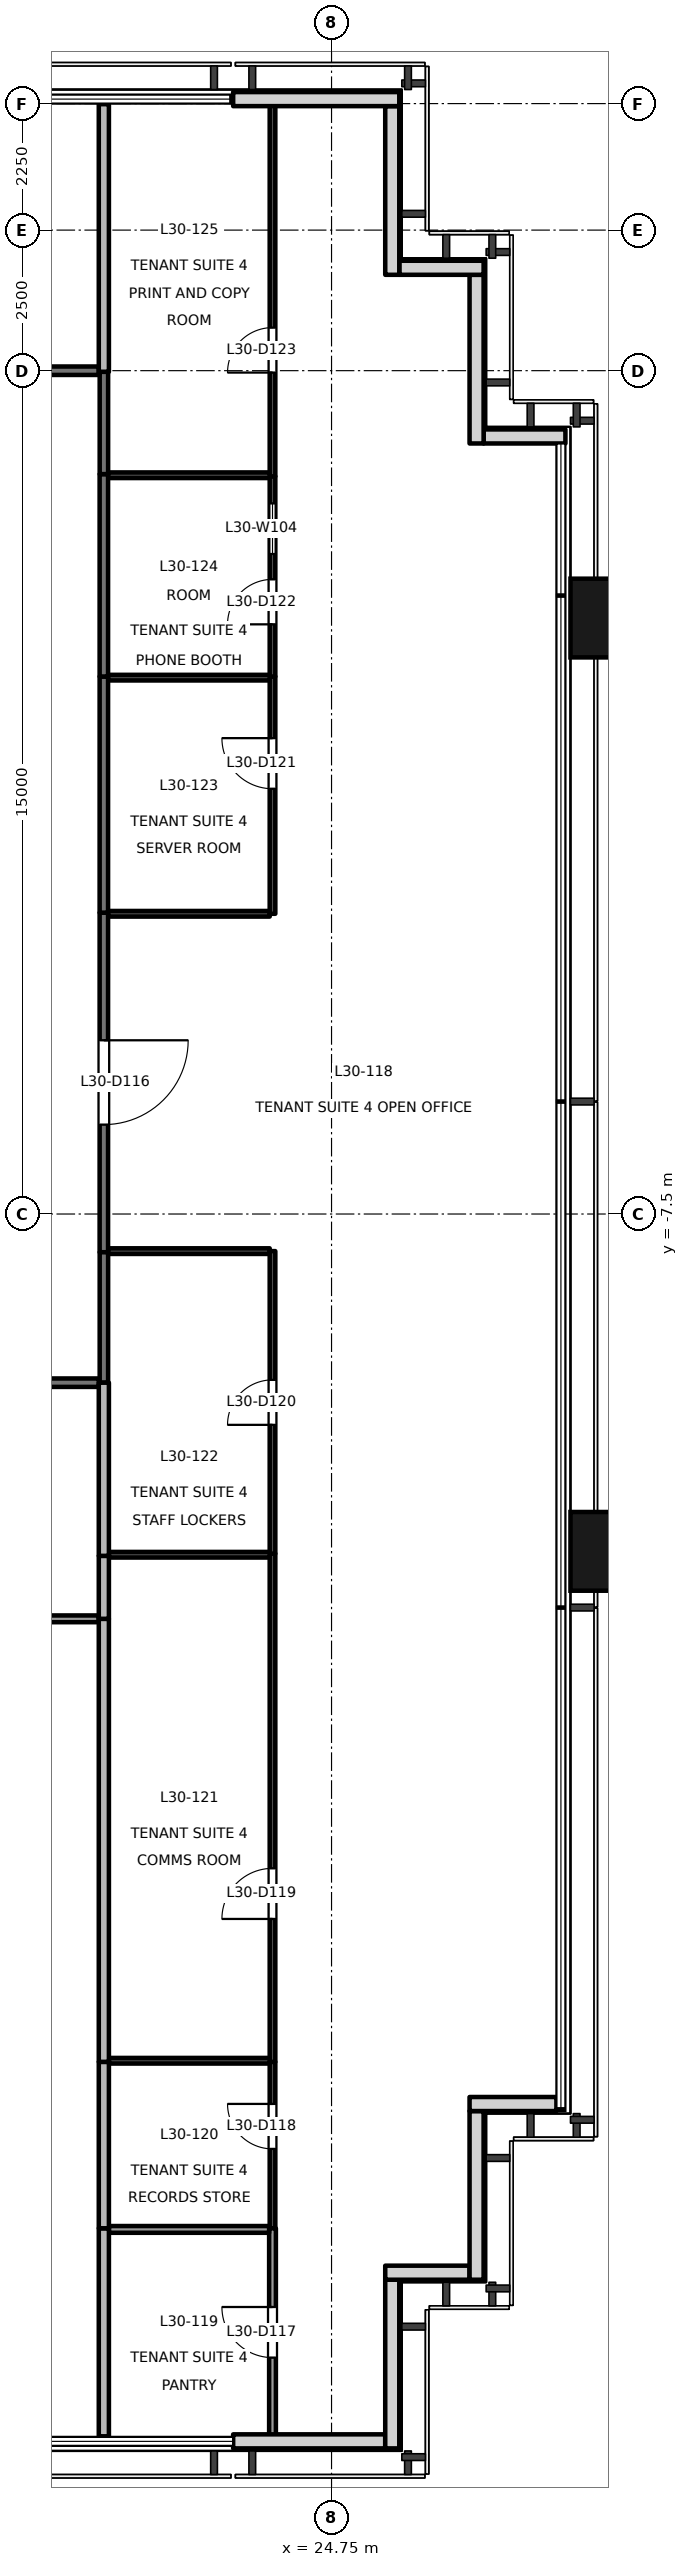
"""IFC4 building model, lengths in metres.
Left out: names, types, materials, properties, quantities, classifications, styles, units other than length and angle.
Written with IfcOpenShell. Run it as: python <this file> out.ifc"""

import sys

from ifc_helpers import new_model, si_unit, direction, frame, frame_2d, origin, origin_2d, place, context, subcontext, project, spatial, rectangle, extrude, element, fill, save


model = new_model("IFC4")
c1 = context("Model", 3, precision=1e-05, world=origin(), true_north=direction((0.0, 1.0)))
c2 = subcontext(c1, "Body", "Model", "MODEL_VIEW")
j1 = project(units=[si_unit("LENGTHUNIT", "METRE"), si_unit("PLANEANGLEUNIT", "RADIAN")], contexts=[c1])
p1 = place(None, origin())
s1 = spatial("IfcSite", under=j1, at=p1, CompositionType="ELEMENT")
p2 = place(p1, origin())
s2 = spatial("IfcBuilding", under=s1, at=p2, CompositionType="ELEMENT")
p3 = place(p2, frame((0.0, 0.0, 134.1)))
s3 = spatial("IfcBuildingStorey", under=s2, at=p3, CompositionType="ELEMENT", Elevation=134.1)
for number, where, z_axis, x_axis in (
    (1, (29.9, -13.5, -0.2), (0.0, 0.0, 1.0), (0.0, 1.0, 0.0)),
    (2, (29.9, 3.1, -0.2), (0.0, 0.0, 1.0), (0.0, 1.0, 0.0)),
):
    element("IfcColumn", number, at=place(p3, frame(where, z_axis=z_axis, x_axis=x_axis)), inside=s3, PredefinedType="COLUMN", context=c2, shape_type="SweptSolid", body=[
        extrude(rectangle(XDim=1.4, YDim=1.8, at=origin_2d()), origin(), (0.0, 0.0, 1.0), 4.0),
    ])
p4 = place(p3, frame((23.0, -29.33, 0.0), z_axis=(0.0, 0.0, 1.0), x_axis=(1.0, 0.0, 0.0)))
e3 = element("IfcWall", 3, at=p4, inside=s3, PredefinedType="SOLIDWALL", context=c2, shape_type="SweptSolid", body=[
    extrude(rectangle(XDim=2.705, YDim=0.25, at=frame_2d((1.353, 0.0))), origin(), (0.0, 0.0, 1.0), 3.8),
])
p5 = place(p3, frame((25.83, -29.455, 0.0), z_axis=(0.0, 0.0, 1.0), x_axis=(0.0, 1.0, 0.0)))
e4 = element("IfcWall", 4, at=p5, inside=s3, PredefinedType="SOLIDWALL", context=c2, shape_type="SweptSolid", body=[
    extrude(rectangle(XDim=3.0, YDim=0.25, at=frame_2d((1.5, 0.0))), origin(), (0.0, 0.0, 1.0), 3.8),
])
p6 = place(p3, frame((25.705, -26.33, 0.0), z_axis=(0.0, 0.0, 1.0), x_axis=(1.0, 0.0, 0.0)))
e5 = element("IfcWall", 5, at=p6, inside=s3, PredefinedType="SOLIDWALL", context=c2, shape_type="SweptSolid", body=[
    extrude(rectangle(XDim=1.5, YDim=0.25, at=frame_2d((0.75, 0.0))), origin(), (0.0, 0.0, 1.0), 3.8),
])
p7 = place(p3, frame((27.33, -26.455, 0.0), z_axis=(0.0, 0.0, 1.0), x_axis=(0.0, 1.0, 0.0)))
e6 = element("IfcWall", 6, at=p7, inside=s3, PredefinedType="SOLIDWALL", context=c2, shape_type="SweptSolid", body=[
    extrude(rectangle(XDim=3.0, YDim=0.25, at=frame_2d((1.5, 0.0))), origin(), (0.0, 0.0, 1.0), 3.8),
])
p8 = place(p3, frame((27.205, -23.33, 0.0), z_axis=(0.0, 0.0, 1.0), x_axis=(1.0, 0.0, 0.0)))
e7 = element("IfcWall", 7, at=p8, inside=s3, PredefinedType="SOLIDWALL", context=c2, shape_type="SweptSolid", body=[
    extrude(rectangle(XDim=1.545, YDim=0.25, at=frame_2d((0.772, 0.0))), origin(), (0.0, 0.0, 1.0), 3.8),
])
p9 = place(p3, frame((28.91, 6.33, 0.0), z_axis=(0.0, 0.0, 1.0), x_axis=(-1.0, 0.0, 0.0)))
e8 = element("IfcWall", 8, at=p9, inside=s3, PredefinedType="SOLIDWALL", context=c2, shape_type="SweptSolid", body=[
    extrude(rectangle(XDim=1.455, YDim=0.25, at=frame_2d((0.728, 0.0))), origin(), (0.0, 0.0, 1.0), 3.8),
])
p10 = place(p3, frame((27.33, 6.205, 0.0), z_axis=(0.0, 0.0, 1.0), x_axis=(0.0, 1.0, 0.0)))
e9 = element("IfcWall", 9, at=p10, inside=s3, PredefinedType="SOLIDWALL", context=c2, shape_type="SweptSolid", body=[
    extrude(rectangle(XDim=3.0, YDim=0.25, at=frame_2d((1.5, 0.0))), origin(), (0.0, 0.0, 1.0), 3.8),
])
p11 = place(p3, frame((27.455, 9.33, 0.0), z_axis=(0.0, 0.0, 1.0), x_axis=(-1.0, 0.0, 0.0)))
e10 = element("IfcWall", 10, at=p11, inside=s3, PredefinedType="SOLIDWALL", context=c2, shape_type="SweptSolid", body=[
    extrude(rectangle(XDim=1.5, YDim=0.25, at=frame_2d((0.75, 0.0))), origin(), (0.0, 0.0, 1.0), 3.8),
])
p12 = place(p3, frame((25.83, 9.205, 0.0), z_axis=(0.0, 0.0, 1.0), x_axis=(0.0, 1.0, 0.0)))
e11 = element("IfcWall", 11, at=p12, inside=s3, PredefinedType="SOLIDWALL", context=c2, shape_type="SweptSolid", body=[
    extrude(rectangle(XDim=3.0, YDim=0.25, at=frame_2d((1.5, 0.0))), origin(), (0.0, 0.0, 1.0), 3.8),
])
p13 = place(p3, frame((25.955, 12.33, 0.0), z_axis=(0.0, 0.0, 1.0), x_axis=(-1.0, 0.0, 0.0)))
e12 = element("IfcWall", 12, at=p13, inside=s3, PredefinedType="SOLIDWALL", context=c2, shape_type="SweptSolid", body=[
    extrude(rectangle(XDim=2.955, YDim=0.25, at=frame_2d((1.478, 0.0))), origin(), (0.0, 0.0, 1.0), 3.8),
])
p14 = place(p3, frame((20.61, -10.5, 0.0), z_axis=(0.0, 0.0, 1.0), x_axis=(-1.0, 0.0, 0.0)))
e13 = element("IfcWall", 13, at=p14, inside=s3, PredefinedType="PARTITIONING", context=c2, shape_type="SweptSolid", body=[
    extrude(rectangle(XDim=8.463, YDim=0.15, at=frame_2d((4.231, 0.0))), origin(), (0.0, 0.0, 1.0), 2.9),
])
p15 = place(p3, frame((20.7, -2.14, 0.0), z_axis=(0.0, 0.0, 1.0), x_axis=(0.0, -1.0, 0.0)))
e14 = element("IfcWall", 14, at=p15, inside=s3, PredefinedType="PARTITIONING", context=c2, shape_type="SweptSolid", body=[
    extrude(rectangle(XDim=6.04, YDim=0.15, at=frame_2d((3.02, 0.0))), origin(), (0.0, 0.0, 1.0), 3.3),
])
p16 = place(p15, frame((2.27, 0.0, 0.0)))
e15 = element("IfcOpeningElement", 15, at=p16, cuts=e14, PredefinedType="OPENING", context=c2, shape_type="SweptSolid", body=[
    extrude(rectangle(XDim=1.5, YDim=2.1, at=frame_2d((0.75, 1.05))), frame((0.0, 0.085, 0.0), z_axis=(0.0, -1.0, 0.0), x_axis=(1.0, 0.0, 0.0)), (0.0, 0.0, 1.0), 0.171),
])
p17 = place(p3, frame((20.701, -8.18, 0.0), z_axis=(0.0, 0.0, 1.0), x_axis=(0.0, -1.0, 0.0)))
e16 = element("IfcWall", 16, at=p17, inside=s3, PredefinedType="PARTITIONING", context=c2, shape_type="SweptSolid", body=[
    extrude(rectangle(XDim=2.32, YDim=0.15, at=frame_2d((1.16, 0.0))), origin(), (0.0, 0.0, 1.0), 3.8),
])
p18 = place(p3, frame((20.7, 2.06, 0.0), z_axis=(0.0, 0.0, 1.0), x_axis=(0.0, -1.0, 0.0)))
e17 = element("IfcWall", 17, at=p18, inside=s3, PredefinedType="PARTITIONING", context=c2, shape_type="SweptSolid", body=[
    extrude(rectangle(XDim=4.2, YDim=0.15, at=frame_2d((2.1, 0.0))), origin(), (0.0, 0.0, 1.0), 3.3),
])
p19 = place(p3, frame((20.7, 5.66, 0.0), z_axis=(0.0, 0.0, 1.0), x_axis=(0.0, -1.0, 0.0)))
e18 = element("IfcWall", 18, at=p19, inside=s3, PredefinedType="PARTITIONING", context=c2, shape_type="SweptSolid", body=[
    extrude(rectangle(XDim=3.6, YDim=0.15, at=frame_2d((1.8, 0.0))), origin(), (0.0, 0.0, 1.0), 3.3),
])
p20 = place(p3, frame((20.701, 7.48, 0.0), z_axis=(0.0, 0.0, 1.0), x_axis=(0.0, -1.0, 0.0)))
e19 = element("IfcWall", 19, at=p20, inside=s3, PredefinedType="PARTITIONING", context=c2, shape_type="SweptSolid", body=[
    extrude(rectangle(XDim=1.82, YDim=0.15, at=frame_2d((0.91, 0.0))), origin(), (0.0, 0.0, 1.0), 3.8),
])
p21 = place(p3, frame((18.0, 7.499, 0.0), z_axis=(0.0, 0.0, 1.0), x_axis=(1.0, 0.0, 0.0)))
e20 = element("IfcWall", 20, at=p21, inside=s3, PredefinedType="PARTITIONING", context=c2, shape_type="SweptSolid", body=[
    extrude(rectangle(XDim=2.61, YDim=0.15, at=frame_2d((1.305, 0.0))), origin(), (0.0, 0.0, 1.0), 3.8),
])
p22 = place(p3, frame((12.167, -14.7, 0.0), z_axis=(0.0, 0.0, 1.0), x_axis=(1.0, 0.0, 0.0)))
e21 = element("IfcWall", 21, at=p22, inside=s3, PredefinedType="PARTITIONING", context=c2, shape_type="SweptSolid", body=[
    extrude(rectangle(XDim=8.443, YDim=0.12, at=frame_2d((4.222, 0.0))), origin(), (0.0, 0.0, 1.0), 2.9),
])
p23 = place(p22, frame((3.771, 0.0, 0.0)))
e22 = element("IfcOpeningElement", 22, at=p23, cuts=e21, PredefinedType="OPENING", context=c2, shape_type="SweptSolid", body=[
    extrude(rectangle(XDim=0.9, YDim=2.1, at=frame_2d((0.45, 1.05))), frame((0.0, 0.071, 0.0), z_axis=(0.0, -1.0, 0.0), x_axis=(1.0, 0.0, 0.0)), (0.0, 0.0, 1.0), 0.141),
])
p24 = place(p3, frame((20.7, -25.54, 0.0), z_axis=(0.0, 0.0, 1.0), x_axis=(0.0, -1.0, 0.0)))
e23 = element("IfcWall", 23, at=p24, inside=s3, PredefinedType="PARTITIONING", context=c2, shape_type="SweptSolid", body=[
    extrude(rectangle(XDim=3.7, YDim=0.18, at=frame_2d((1.85, 0.0))), origin(), (0.0, 0.0, 1.0), 3.8),
])
p25 = place(p3, frame((20.7, -22.58, 0.0), z_axis=(0.0, 0.0, 1.0), x_axis=(0.0, -1.0, 0.0)))
e24 = element("IfcWall", 24, at=p25, inside=s3, PredefinedType="PARTITIONING", context=c2, shape_type="SweptSolid", body=[
    extrude(rectangle(XDim=2.96, YDim=0.18, at=frame_2d((1.48, 0.0))), origin(), (0.0, 0.0, 1.0), 3.8),
])
p26 = place(p3, frame((20.7, -14.7, 0.0), z_axis=(0.0, 0.0, 1.0), x_axis=(0.0, -1.0, 0.0)))
e25 = element("IfcWall", 25, at=p26, inside=s3, PredefinedType="PARTITIONING", context=c2, shape_type="SweptSolid", body=[
    extrude(rectangle(XDim=7.88, YDim=0.18, at=frame_2d((3.94, 0.0))), origin(), (0.0, 0.0, 1.0), 3.8),
])
p27 = place(p3, frame((20.7, -13.58, 0.0), z_axis=(0.0, 0.0, 1.0), x_axis=(0.0, -1.0, 0.0)))
e26 = element("IfcWall", 26, at=p27, inside=s3, PredefinedType="PARTITIONING", context=c2, shape_type="SweptSolid", body=[
    extrude(rectangle(XDim=1.12, YDim=0.18, at=frame_2d((0.56, 0.0))), origin(), (0.0, 0.0, 1.0), 3.8),
])
p28 = place(p3, frame((20.7, -10.5, 0.0), z_axis=(0.0, 0.0, 1.0), x_axis=(0.0, -1.0, 0.0)))
e27 = element("IfcWall", 27, at=p28, inside=s3, PredefinedType="PARTITIONING", context=c2, shape_type="SweptSolid", body=[
    extrude(rectangle(XDim=3.08, YDim=0.18, at=frame_2d((1.54, 0.0))), origin(), (0.0, 0.0, 1.0), 3.8),
])
p29 = place(p3, frame((23.7, -29.24, 0.0), z_axis=(0.0, 0.0, 1.0), x_axis=(0.0, 1.0, 0.0)))
e28 = element("IfcWall", 28, at=p29, inside=s3, PredefinedType="PARTITIONING", context=c2, shape_type="SweptSolid", body=[
    extrude(rectangle(XDim=3.7, YDim=0.12, at=frame_2d((1.85, 0.0))), origin(), (0.0, 0.0, 1.0), 3.8),
])
p30 = place(p29, frame((1.4, 0.0, 0.0)))
e29 = element("IfcOpeningElement", 29, at=p30, cuts=e28, PredefinedType="OPENING", context=c2, shape_type="SweptSolid", body=[
    extrude(rectangle(XDim=0.9, YDim=2.1, at=frame_2d((0.45, 1.05))), frame((0.0, 0.071, 0.0), z_axis=(0.0, -1.0, 0.0), x_axis=(1.0, 0.0, 0.0)), (0.0, 0.0, 1.0), 0.141),
])
p31 = place(p3, frame((23.7, -25.54, 0.0), z_axis=(0.0, 0.0, 1.0), x_axis=(0.0, 1.0, 0.0)))
e30 = element("IfcWall", 30, at=p31, inside=s3, PredefinedType="PARTITIONING", context=c2, shape_type="SweptSolid", body=[
    extrude(rectangle(XDim=2.96, YDim=0.1, at=frame_2d((1.48, 0.0))), origin(), (0.0, 0.0, 1.0), 3.8),
])
p32 = place(p31, frame((1.412, 0.0, 0.0)))
e31 = element("IfcOpeningElement", 31, at=p32, cuts=e30, PredefinedType="OPENING", context=c2, shape_type="SweptSolid", body=[
    extrude(rectangle(XDim=0.8, YDim=2.1, at=frame_2d((0.4, 1.05))), frame((0.0, 0.061, 0.0), z_axis=(0.0, -1.0, 0.0), x_axis=(1.0, 0.0, 0.0)), (0.0, 0.0, 1.0), 0.121),
])
p33 = place(p3, frame((23.7, -22.58, 0.0), z_axis=(0.0, 0.0, 1.0), x_axis=(0.0, 1.0, 0.0)))
e32 = element("IfcWall", 32, at=p33, inside=s3, PredefinedType="PARTITIONING", context=c2, shape_type="SweptSolid", body=[
    extrude(rectangle(XDim=9.04, YDim=0.1, at=frame_2d((4.52, 0.0))), origin(), (0.0, 0.0, 1.0), 3.8),
])
p34 = place(p33, frame((2.542, 0.0, 0.0)))
e33 = element("IfcOpeningElement", 33, at=p34, cuts=e32, PredefinedType="OPENING", context=c2, shape_type="SweptSolid", body=[
    extrude(rectangle(XDim=0.9, YDim=2.1, at=frame_2d((0.45, 1.05))), frame((0.0, 0.061, 0.0), z_axis=(0.0, -1.0, 0.0), x_axis=(1.0, 0.0, 0.0)), (0.0, 0.0, 1.0), 0.121),
])
p35 = place(p3, frame((23.65, -8.16, 0.0), z_axis=(0.0, 0.0, 1.0), x_axis=(-1.0, 0.0, 0.0)))
e34 = element("IfcWall", 34, at=p35, inside=s3, PredefinedType="PARTITIONING", context=c2, shape_type="SweptSolid", body=[
    extrude(rectangle(XDim=2.875, YDim=0.1, at=frame_2d((1.438, 0.0))), origin(), (0.0, 0.0, 1.0), 3.8),
])
p36 = place(p3, frame((23.7, -13.54, 0.0), z_axis=(0.0, 0.0, 1.0), x_axis=(0.0, 1.0, 0.0)))
e35 = element("IfcWall", 35, at=p36, inside=s3, PredefinedType="PARTITIONING", context=c2, shape_type="SweptSolid", body=[
    extrude(rectangle(XDim=5.38, YDim=0.1, at=frame_2d((2.69, 0.0))), origin(), (0.0, 0.0, 1.0), 3.8),
])
p37 = place(p36, frame((2.29, 0.0, 0.0)))
e36 = element("IfcOpeningElement", 36, at=p37, cuts=e35, PredefinedType="OPENING", context=c2, shape_type="SweptSolid", body=[
    extrude(rectangle(XDim=0.8, YDim=2.1, at=frame_2d((0.4, 1.05))), frame((0.0, 0.061, 0.0), z_axis=(0.0, -1.0, 0.0), x_axis=(1.0, 0.0, 0.0)), (0.0, 0.0, 1.0), 0.121),
])
p38 = place(p3, frame((20.775, -2.16, 0.0), z_axis=(0.0, 0.0, 1.0), x_axis=(1.0, 0.0, 0.0)))
e37 = element("IfcWall", 37, at=p38, inside=s3, PredefinedType="PARTITIONING", context=c2, shape_type="SweptSolid", body=[
    extrude(rectangle(XDim=2.875, YDim=0.1, at=frame_2d((1.438, 0.0))), origin(), (0.0, 0.0, 1.0), 3.8),
])
p39 = place(p3, frame((23.7, -2.16, 0.0), z_axis=(0.0, 0.0, 1.0), x_axis=(0.0, 1.0, 0.0)))
e38 = element("IfcWall", 38, at=p39, inside=s3, PredefinedType="PARTITIONING", context=c2, shape_type="SweptSolid", body=[
    extrude(rectangle(XDim=4.22, YDim=0.1, at=frame_2d((2.11, 0.0))), origin(), (0.0, 0.0, 1.0), 3.3),
])
p40 = place(p39, frame((2.224, 0.0, 0.0)))
e39 = element("IfcOpeningElement", 39, at=p40, cuts=e38, PredefinedType="OPENING", context=c2, shape_type="SweptSolid", body=[
    extrude(rectangle(XDim=0.9, YDim=2.1, at=frame_2d((0.45, 1.05))), frame((0.0, 0.061, 0.0), z_axis=(0.0, -1.0, 0.0), x_axis=(1.0, 0.0, 0.0)), (0.0, 0.0, 1.0), 0.121),
])
p41 = place(p3, frame((23.7, 2.06, 0.0), z_axis=(0.0, 0.0, 1.0), x_axis=(0.0, 1.0, 0.0)))
e40 = element("IfcWall", 40, at=p41, inside=s3, PredefinedType="PARTITIONING", context=c2, shape_type="SweptSolid", body=[
    extrude(rectangle(XDim=3.56, YDim=0.1, at=frame_2d((1.78, 0.0))), origin(), (0.0, 0.0, 1.0), 3.3),
])
p42 = place(p41, frame((0.928, 0.0, 0.0)))
e41 = element("IfcOpeningElement", 41, at=p42, cuts=e40, PredefinedType="OPENING", context=c2, shape_type="SweptSolid", body=[
    extrude(rectangle(XDim=0.8, YDim=2.1, at=frame_2d((0.4, 1.05))), frame((0.0, 0.061, 0.0), z_axis=(0.0, -1.0, 0.0), x_axis=(1.0, 0.0, 0.0)), (0.0, 0.0, 1.0), 0.121),
])
p43 = place(p41, frame((2.179, 0.0, 0.9)))
e42 = element("IfcOpeningElement", 42, at=p43, cuts=e40, PredefinedType="OPENING", context=c2, shape_type="SweptSolid", body=[
    extrude(rectangle(XDim=0.9, YDim=1.2, at=frame_2d((0.45, 0.6))), frame((0.0, 0.061, 0.0), z_axis=(0.0, -1.0, 0.0), x_axis=(1.0, 0.0, 0.0)), (0.0, 0.0, 1.0), 0.121),
])
p44 = place(p3, frame((23.7, 5.62, 0.0), z_axis=(0.0, 0.0, 1.0), x_axis=(0.0, 1.0, 0.0)))
e43 = element("IfcWall", 43, at=p44, inside=s3, PredefinedType="PARTITIONING", context=c2, shape_type="SweptSolid", body=[
    extrude(rectangle(XDim=6.62, YDim=0.1, at=frame_2d((3.31, 0.0))), origin(), (0.0, 0.0, 1.0), 3.8),
])
p45 = place(p44, frame((1.846, 0.0, 0.0)))
e44 = element("IfcOpeningElement", 44, at=p45, cuts=e43, PredefinedType="OPENING", context=c2, shape_type="SweptSolid", body=[
    extrude(rectangle(XDim=0.8, YDim=2.1, at=frame_2d((0.4, 1.05))), frame((0.0, 0.061, 0.0), z_axis=(0.0, -1.0, 0.0), x_axis=(1.0, 0.0, 0.0)), (0.0, 0.0, 1.0), 0.121),
])
p46 = place(p3, frame((20.79, -25.56, 0.0), z_axis=(0.0, 0.0, 1.0), x_axis=(1.0, 0.0, 0.0)))
e45 = element("IfcWall", 45, at=p46, inside=s3, PredefinedType="PARTITIONING", context=c2, shape_type="SweptSolid", body=[
    extrude(rectangle(XDim=2.85, YDim=0.12, at=frame_2d((1.425, 0.0))), origin(), (0.0, 0.0, 1.0), 3.8),
])
for number, where, z_axis, x_axis in (
    (46, (20.79, -22.56, 0.0), (0.0, 0.0, 1.0), (1.0, 0.0, 0.0)),
    (47, (20.79, -13.56, 0.0), (0.0, 0.0, 1.0), (1.0, 0.0, 0.0)),
):
    element("IfcWall", number, at=place(p3, frame(where, z_axis=z_axis, x_axis=x_axis)), inside=s3, PredefinedType="PARTITIONING", context=c2, shape_type="SweptSolid", body=[
        extrude(rectangle(XDim=2.86, YDim=0.1, at=frame_2d((1.43, 0.0))), origin(), (0.0, 0.0, 1.0), 3.8),
    ])
for number, where, z_axis, x_axis in (
    (48, (20.775, 2.04, 0.0), (0.0, 0.0, 1.0), (1.0, 0.0, 0.0)),
    (49, (20.775, 5.64, 0.0), (0.0, 0.0, 1.0), (1.0, 0.0, 0.0)),
):
    element("IfcWall", number, at=place(p3, frame(where, z_axis=z_axis, x_axis=x_axis)), inside=s3, PredefinedType="PARTITIONING", context=c2, shape_type="SweptSolid", body=[
        extrude(rectangle(XDim=2.875, YDim=0.1, at=frame_2d((1.438, 0.0))), origin(), (0.0, 0.0, 1.0), 3.8),
    ])
p47 = place(p3, frame((20.7, 7.48, 0.0), z_axis=(0.0, 0.0, 1.0), x_axis=(0.0, 1.0, 0.0)))
e50 = element("IfcWall", 50, at=p47, inside=s3, PredefinedType="PARTITIONING", context=c2, shape_type="SweptSolid", body=[
    extrude(rectangle(XDim=4.76, YDim=0.18, at=frame_2d((2.38, 0.0))), origin(), (0.0, 0.0, 1.0), 3.8),
])
p48 = place(p16, origin())
e51 = element("IfcDoor", 51, at=p48, inside=s3, OperationType="DOUBLE_DOOR_SINGLE_SWING", PredefinedType="DOOR", context=c2, shape_type="SweptSolid", body=[
    extrude(rectangle(XDim=1.5, YDim=2.1, at=frame_2d((0.75, 1.05))), frame((0.0, 0.025, 0.0), z_axis=(0.0, -1.0, 0.0), x_axis=(1.0, 0.0, 0.0)), (0.0, 0.0, 1.0), 0.05),
])
fill(e15, e51)
p49 = place(p30, origin())
e52 = element("IfcDoor", 52, at=p49, inside=s3, OperationType="SINGLE_SWING_RIGHT", PredefinedType="DOOR", context=c2, shape_type="SweptSolid", body=[
    extrude(rectangle(XDim=0.9, YDim=2.1, at=frame_2d((0.45, 1.05))), frame((0.0, 0.025, 0.0), z_axis=(0.0, -1.0, 0.0), x_axis=(1.0, 0.0, 0.0)), (0.0, 0.0, 1.0), 0.05),
])
fill(e29, e52)
p50 = place(p32, origin())
e53 = element("IfcDoor", 53, at=p50, inside=s3, OperationType="SINGLE_SWING_RIGHT", PredefinedType="DOOR", context=c2, shape_type="SweptSolid", body=[
    extrude(rectangle(XDim=0.8, YDim=2.1, at=frame_2d((0.4, 1.05))), frame((0.0, 0.025, 0.0), z_axis=(0.0, -1.0, 0.0), x_axis=(1.0, 0.0, 0.0)), (0.0, 0.0, 1.0), 0.05),
])
fill(e31, e53)
p51 = place(p34, origin())
e54 = element("IfcDoor", 54, at=p51, inside=s3, OperationType="SINGLE_SWING_LEFT", PredefinedType="DOOR", context=c2, shape_type="SweptSolid", body=[
    extrude(rectangle(XDim=0.9, YDim=2.1, at=frame_2d((0.45, 1.05))), frame((0.0, 0.025, 0.0), z_axis=(0.0, -1.0, 0.0), x_axis=(1.0, 0.0, 0.0)), (0.0, 0.0, 1.0), 0.05),
])
fill(e33, e54)
p52 = place(p37, origin())
e55 = element("IfcDoor", 55, at=p52, inside=s3, OperationType="SINGLE_SWING_LEFT", PredefinedType="DOOR", context=c2, shape_type="SweptSolid", body=[
    extrude(rectangle(XDim=0.8, YDim=2.1, at=frame_2d((0.4, 1.05))), frame((0.0, 0.025, 0.0), z_axis=(0.0, -1.0, 0.0), x_axis=(1.0, 0.0, 0.0)), (0.0, 0.0, 1.0), 0.05),
])
fill(e36, e55)
p53 = place(p40, origin())
e56 = element("IfcDoor", 56, at=p53, inside=s3, OperationType="SINGLE_SWING_RIGHT", PredefinedType="DOOR", context=c2, shape_type="SweptSolid", body=[
    extrude(rectangle(XDim=0.9, YDim=2.1, at=frame_2d((0.45, 1.05))), frame((0.0, 0.025, 0.0), z_axis=(0.0, -1.0, 0.0), x_axis=(1.0, 0.0, 0.0)), (0.0, 0.0, 1.0), 0.05),
])
fill(e39, e56)
p54 = place(p42, origin())
e57 = element("IfcDoor", 57, at=p54, inside=s3, OperationType="SINGLE_SWING_LEFT", PredefinedType="DOOR", context=c2, shape_type="SweptSolid", body=[
    extrude(rectangle(XDim=0.8, YDim=2.1, at=frame_2d((0.4, 1.05))), frame((0.0, 0.025, 0.0), z_axis=(0.0, -1.0, 0.0), x_axis=(1.0, 0.0, 0.0)), (0.0, 0.0, 1.0), 0.05),
])
fill(e41, e57)
p55 = place(p45, origin())
e58 = element("IfcDoor", 58, at=p55, inside=s3, OperationType="SINGLE_SWING_LEFT", PredefinedType="DOOR", context=c2, shape_type="SweptSolid", body=[
    extrude(rectangle(XDim=0.8, YDim=2.1, at=frame_2d((0.4, 1.05))), frame((0.0, 0.025, 0.0), z_axis=(0.0, -1.0, 0.0), x_axis=(1.0, 0.0, 0.0)), (0.0, 0.0, 1.0), 0.05),
])
fill(e44, e58)
p56 = place(p43, origin())
e59 = element("IfcWindow", 59, at=p56, inside=s3, PartitioningType="SINGLE_PANEL", PredefinedType="WINDOW", context=c2, shape_type="SweptSolid", body=[
    extrude(rectangle(XDim=0.9, YDim=1.2, at=frame_2d((0.45, 0.6))), frame((0.0, 0.03, 0.0), z_axis=(0.0, -1.0, 0.0), x_axis=(1.0, 0.0, 0.0)), (0.0, 0.0, 1.0), 0.06),
])
fill(e42, e59)
save(model, sys.argv[1])
